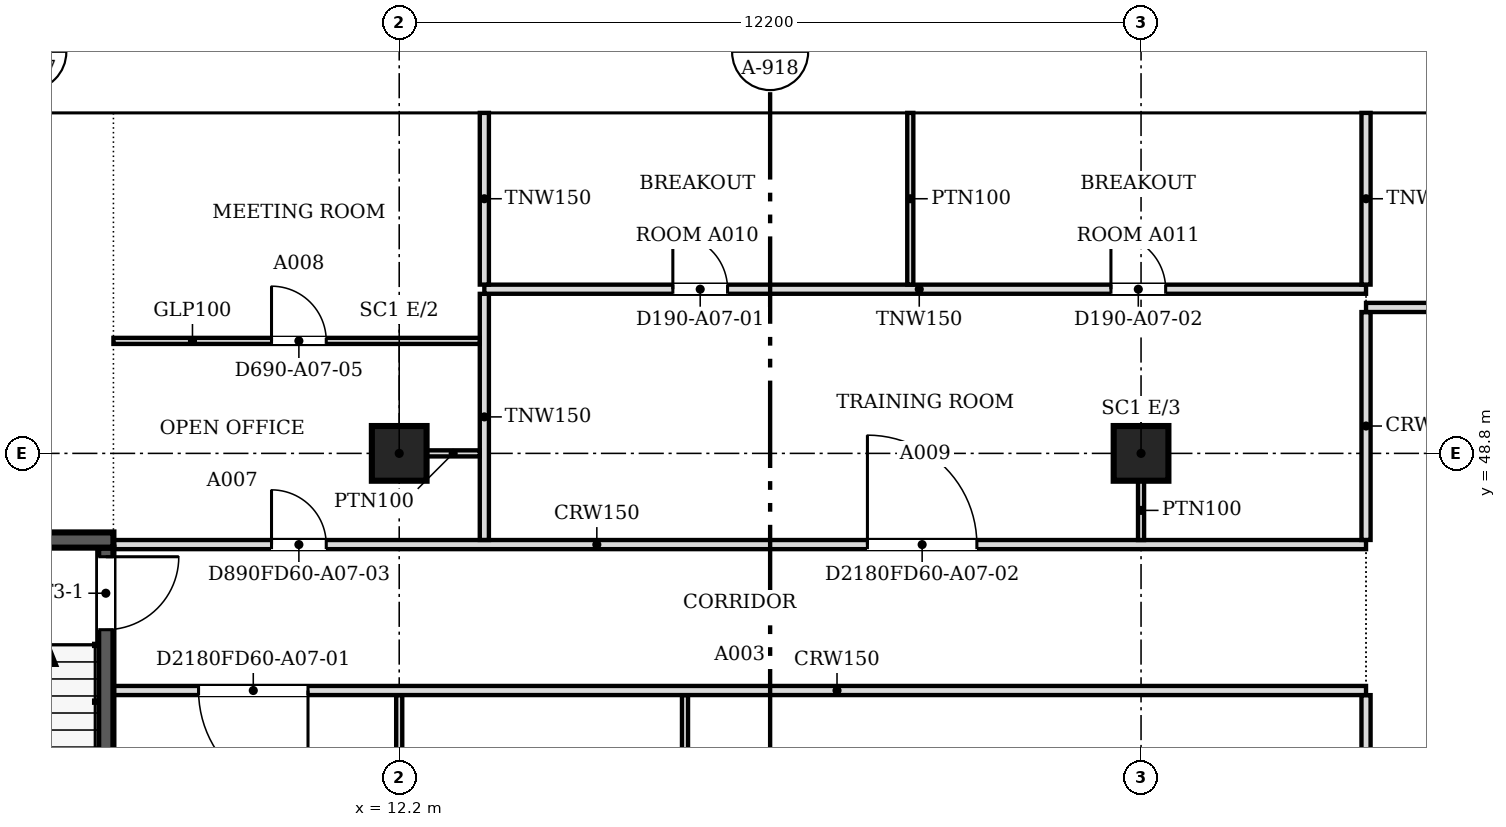
"""IFC4 building model, lengths in metres.
Left out: names, types, materials, properties, quantities, classifications, styles, units other than length and angle.
Written with IfcOpenShell. Run it as: python <this file> out.ifc"""

import sys

from ifc_helpers import new_model, si_unit, direction, frame, frame_2d, origin, origin_2d, place, context, subcontext, project, spatial, polyline, rectangle, outline, extrude, faceted_brep, source, transform, mapped, element, fill, save


model = new_model("IFC4")
c1 = context("Model", 3, precision=1e-05, world=origin(), true_north=direction((0.0, 1.0)))
c2 = subcontext(c1, "Body", "Model", "MODEL_VIEW")
j1 = project(units=[si_unit("LENGTHUNIT", "METRE"), si_unit("PLANEANGLEUNIT", "RADIAN")], contexts=[c1])
p1 = place(None, origin())
s1 = spatial("IfcSite", under=j1, at=p1, CompositionType="ELEMENT")
p2 = place(p1, origin())
s2 = spatial("IfcBuilding", under=s1, at=p2, CompositionType="ELEMENT")
p3 = place(p2, frame((0.0, 0.0, 80.0)))
s3 = spatial("IfcBuildingStorey", under=s2, at=p3, CompositionType="ELEMENT", Elevation=80.0)
for number, where, z_axis, x_axis in (
    (1, (12.2, 48.8, 0.0), (0.0, 0.0, 1.0), (1.0, 0.0, 0.0)),
    (2, (24.4, 48.8, 0.0), (0.0, 0.0, 1.0), (1.0, 0.0, 0.0)),
):
    element("IfcColumn", number, at=place(p3, frame(where, z_axis=z_axis, x_axis=x_axis)), inside=s3, PredefinedType="COLUMN", context=c2, shape_type="SweptSolid", body=[
        extrude(rectangle(XDim=0.9, YDim=0.9, at=origin_2d()), origin(), (0.0, 0.0, 1.0), 3.6),
    ])
m1 = source(origin(), c2, "Body", "SweptSolid", [
    extrude(outline(polyline([(3.05, 0.0), (6.1, 3.8), (3.05, 7.6), (0.0, 3.8), (3.05, 0.0)])), frame((0.0, 0.25, 0.0), z_axis=(0.0, -1.0, 0.0), x_axis=(1.0, 0.0, 0.0)), (0.0, 0.0, 1.0), 0.5),
])
p4 = place(p3, frame((30.5, 54.65, -3.8), z_axis=(0.0, 0.0, 1.0), x_axis=(-1.0, 0.0, 0.0)))
e3 = element("IfcWall", 3, at=p4, inside=s3, PredefinedType="SOLIDWALL", context=c2, shape_type="MappedRepresentation", body=[
    mapped(m1, transform((0.0, 0.0, 0.0), scale=1.0)),
])
m2 = source(origin(), c2, "Body", "SweptSolid", [
    extrude(outline(polyline([(3.05, 0.399), (5.78, 3.8), (3.05, 7.201), (0.321, 3.8), (3.05, 0.399)])), frame((0.0, 0.26, 0.0), z_axis=(0.0, -1.0, 0.0), x_axis=(1.0, 0.0, 0.0)), (0.0, 0.0, 1.0), 0.52),
])
p5 = place(p4, origin())
e4 = element("IfcOpeningElement", 4, at=p5, cuts=e3, PredefinedType="OPENING", context=c2, shape_type="MappedRepresentation", body=[
    mapped(m2, transform((0.0, 0.0, 0.0), scale=1.0)),
])
m3 = source(origin(), c2, "Body", "Brep", [
    faceted_brep([(3.05, -0.25, 0.0), (6.1, -0.25, 3.8), (6.1, -0.25, 3.8), (3.05, -0.25, 7.6), (0.0, -0.25, 3.8), (0.0, 0.25, 3.8), (3.05, 0.25, 7.6), (6.1, 0.25, 3.8), (6.1, 0.25, 3.8), (3.05, 0.25, 0.0)], [[[0, 1, 2, 3, 4]], [[5, 6, 7, 8, 9]], [[9, 8, 1, 0]], [[7, 6, 3, 2]], [[6, 5, 4, 3]], [[5, 9, 0, 4]], [[1, 8, 7, 2]]]),
])
p6 = place(p3, frame((24.4, 54.65, -3.8), z_axis=(0.0, 0.0, 1.0), x_axis=(-1.0, 0.0, 0.0)))
e5 = element("IfcWall", 5, at=p6, inside=s3, PredefinedType="SOLIDWALL", context=c2, shape_type="MappedRepresentation", body=[
    mapped(m3, transform((0.0, 0.0, 0.0), scale=1.0)),
])
p7 = place(p6, origin())
e6 = element("IfcOpeningElement", 6, at=p7, cuts=e5, PredefinedType="OPENING", context=c2, shape_type="MappedRepresentation", body=[
    mapped(m2, transform((0.0, 0.0, 0.0), scale=1.0)),
])
p8 = place(p3, frame((18.3, 54.65, -3.8), z_axis=(0.0, 0.0, 1.0), x_axis=(-1.0, 0.0, 0.0)))
e7 = element("IfcWall", 7, at=p8, inside=s3, PredefinedType="SOLIDWALL", context=c2, shape_type="MappedRepresentation", body=[
    mapped(m1, transform((0.0, 0.0, 0.0), scale=1.0)),
])
p9 = place(p8, origin())
e8 = element("IfcOpeningElement", 8, at=p9, cuts=e7, PredefinedType="OPENING", context=c2, shape_type="MappedRepresentation", body=[
    mapped(m2, transform((0.0, 0.0, 0.0), scale=1.0)),
])
m4 = source(origin(), c2, "Body", "Brep", [
    faceted_brep([(3.05, -0.25, 0.0), (6.053, -0.25, 3.8), (3.05, -0.25, 7.6), (0.0, -0.25, 3.8), (0.0, 0.25, 3.8), (3.05, 0.25, 7.6), (6.007, 0.25, 3.859), (6.007, 0.25, 3.741), (3.05, 0.25, 0.0), (6.053, 0.0, 3.8)], [[[0, 1, 2, 3]], [[4, 5, 6, 7, 8]], [[8, 7, 9, 1, 0]], [[6, 5, 2, 1, 9]], [[5, 4, 3, 2]], [[4, 8, 0, 3]], [[9, 7, 6]]]),
])
p10 = place(p3, frame((12.2, 54.65, -3.8), z_axis=(0.0, 0.0, 1.0), x_axis=(-1.0, 0.0, 0.0)))
e9 = element("IfcWall", 9, at=p10, inside=s3, PredefinedType="SOLIDWALL", context=c2, shape_type="MappedRepresentation", body=[
    mapped(m4, transform((0.0, 0.0, 0.0), scale=1.0)),
])
m5 = source(origin(), c2, "Body", "SweptSolid", [
    extrude(outline(polyline([(3.049, 0.401), (5.735, 3.8), (3.049, 7.199), (0.321, 3.8), (3.049, 0.401)])), frame((0.0, 0.26, 0.0), z_axis=(0.0, -1.0, 0.0), x_axis=(1.0, 0.0, 0.0)), (0.0, 0.0, 1.0), 0.52),
])
p11 = place(p10, origin())
e10 = element("IfcOpeningElement", 10, at=p11, cuts=e9, PredefinedType="OPENING", context=c2, shape_type="MappedRepresentation", body=[
    mapped(m5, transform((0.0, 0.0, 0.0), scale=1.0)),
])
p12 = place(p2, frame((0.0, 0.0, 83.8)))
s4 = spatial("IfcBuildingStorey", under=s2, at=p12, CompositionType="ELEMENT", Elevation=83.8)
p13 = place(p12, frame((33.55, 54.65, -3.8), z_axis=(0.0, 0.0, 1.0), x_axis=(-1.0, 0.0, 0.0)))
e11 = element("IfcWall", 11, at=p13, inside=s4, PredefinedType="SOLIDWALL", context=c2, shape_type="MappedRepresentation", body=[
    mapped(m1, transform((0.0, 0.0, 0.0), scale=1.0)),
])
p14 = place(p13, origin())
e12 = element("IfcOpeningElement", 12, at=p14, cuts=e11, PredefinedType="OPENING", context=c2, shape_type="MappedRepresentation", body=[
    mapped(m2, transform((0.0, 0.0, 0.0), scale=1.0)),
])
p15 = place(p12, frame((27.45, 54.65, -3.8), z_axis=(0.0, 0.0, 1.0), x_axis=(-1.0, 0.0, 0.0)))
e13 = element("IfcWall", 13, at=p15, inside=s4, PredefinedType="SOLIDWALL", context=c2, shape_type="MappedRepresentation", body=[
    mapped(m3, transform((0.0, 0.0, 0.0), scale=1.0)),
])
p16 = place(p15, origin())
e14 = element("IfcOpeningElement", 14, at=p16, cuts=e13, PredefinedType="OPENING", context=c2, shape_type="MappedRepresentation", body=[
    mapped(m2, transform((0.0, 0.0, 0.0), scale=1.0)),
])
p17 = place(p12, frame((21.35, 54.65, -3.8), z_axis=(0.0, 0.0, 1.0), x_axis=(-1.0, 0.0, 0.0)))
e15 = element("IfcWall", 15, at=p17, inside=s4, PredefinedType="SOLIDWALL", context=c2, shape_type="MappedRepresentation", body=[
    mapped(m1, transform((0.0, 0.0, 0.0), scale=1.0)),
])
p18 = place(p17, origin())
e16 = element("IfcOpeningElement", 16, at=p18, cuts=e15, PredefinedType="OPENING", context=c2, shape_type="MappedRepresentation", body=[
    mapped(m2, transform((0.0, 0.0, 0.0), scale=1.0)),
])
p19 = place(p12, frame((15.25, 54.65, -3.8), z_axis=(0.0, 0.0, 1.0), x_axis=(-1.0, 0.0, 0.0)))
e17 = element("IfcWall", 17, at=p19, inside=s4, PredefinedType="SOLIDWALL", context=c2, shape_type="MappedRepresentation", body=[
    mapped(m1, transform((0.0, 0.0, 0.0), scale=1.0)),
])
p20 = place(p19, origin())
e18 = element("IfcOpeningElement", 18, at=p20, cuts=e17, PredefinedType="OPENING", context=c2, shape_type="MappedRepresentation", body=[
    mapped(m2, transform((0.0, 0.0, 0.0), scale=1.0)),
])
m6 = source(origin(), c2, "Body", "Brep", [
    faceted_brep([(3.003, -0.25, 0.0), (3.05, -0.25, 0.06), (3.05, -0.25, 7.54), (3.003, -0.25, 7.6), (0.0, -0.25, 3.8), (0.0, 0.25, 3.8), (2.957, 0.25, 7.541), (2.957, 0.25, 0.059), (3.003, 0.0, 0.0), (3.003, 0.0, 7.6)], [[[0, 1, 2, 3, 4]], [[5, 6, 7]], [[1, 0, 8]], [[9, 3, 2]], [[6, 5, 4, 3, 9]], [[5, 7, 8, 0, 4]], [[1, 8, 7, 6, 9, 2]]]),
])
p21 = place(p12, frame((9.15, 54.65, -3.8), z_axis=(0.0, 0.0, 1.0), x_axis=(-1.0, 0.0, 0.0)))
e19 = element("IfcWall", 19, at=p21, inside=s4, PredefinedType="SOLIDWALL", context=c2, shape_type="MappedRepresentation", body=[
    mapped(m6, transform((0.0, 0.0, 0.0), scale=1.0)),
])
m7 = source(origin(), c2, "Body", "SweptSolid", [
    extrude(outline(polyline([(2.803, 6.944), (0.319, 3.8), (2.803, 0.656), (2.803, 6.944)])), frame((0.0, 0.26, 0.0), z_axis=(0.0, -1.0, 0.0), x_axis=(1.0, 0.0, 0.0)), (0.0, 0.0, 1.0), 0.52),
])
p22 = place(p21, origin())
e20 = element("IfcOpeningElement", 20, at=p22, cuts=e19, PredefinedType="OPENING", context=c2, shape_type="MappedRepresentation", body=[
    mapped(m7, transform((0.0, 0.0, 0.0), scale=1.0)),
])
p23 = place(p3, frame((3.6, 47.375, 0.0), z_axis=(0.0, 0.0, 1.0), x_axis=(1.0, 0.0, 0.0)))
e21 = element("IfcWall", 21, at=p23, inside=s3, PredefinedType="SOLIDWALL", context=c2, shape_type="SweptSolid", body=[
    extrude(rectangle(XDim=3.9, YDim=0.25, at=frame_2d((1.95, 0.0))), origin(), (0.0, 0.0, 1.0), 3.8),
])
p24 = place(p3, frame((7.375, 47.25, 0.0), z_axis=(0.0, 0.0, 1.0), x_axis=(0.0, -1.0, 0.0)))
e22 = element("IfcWall", 22, at=p24, inside=s3, PredefinedType="SOLIDWALL", context=c2, shape_type="SweptSolid", body=[
    extrude(rectangle(XDim=8.0, YDim=0.25, at=frame_2d((4.0, 0.0))), origin(), (0.0, 0.0, 1.0), 3.8),
])
m8 = source(origin(), c2, "Body", "SweptSolid", [
    extrude(rectangle(XDim=1.2, YDim=2.1, at=frame_2d((0.6, 1.05))), frame((0.0, 0.135, 0.0), z_axis=(0.0, -1.0, 0.0), x_axis=(1.0, 0.0, 0.0)), (0.0, 0.0, 1.0), 0.27),
])
p25 = place(p24, frame((0.15, 0.0, 0.0)))
e23 = element("IfcOpeningElement", 23, at=p25, cuts=e22, PredefinedType="OPENING", context=c2, shape_type="MappedRepresentation", body=[
    mapped(m8, transform((0.0, 0.0, 0.0), scale=1.0)),
])
p26 = place(p3, frame((28.1, 18.8, 0.0), z_axis=(0.0, 0.0, 1.0), x_axis=(0.0, 1.0, 0.0)))
e24 = element("IfcWall", 24, at=p26, inside=s3, PredefinedType="PARTITIONING", context=c2, shape_type="SweptSolid", body=[
    extrude(rectangle(XDim=26.024, YDim=0.15, at=frame_2d((13.012, 0.0))), origin(), (0.0, 0.0, 1.0), 3.067),
])
m9 = source(origin(), c2, "Body", "SweptSolid", [
    extrude(rectangle(XDim=0.9, YDim=2.1, at=frame_2d((0.45, 1.05))), frame((0.0, 0.085, 0.0), z_axis=(0.0, -1.0, 0.0), x_axis=(1.0, 0.0, 0.0)), (0.0, 0.0, 1.0), 0.17),
])
p27 = place(p26, frame((1.1, 0.0, 0.0)))
e25 = element("IfcOpeningElement", 25, at=p27, cuts=e24, PredefinedType="OPENING", context=c2, shape_type="MappedRepresentation", body=[
    mapped(m9, transform((0.0, 0.0, 0.0), scale=1.0)),
])
m10 = source(origin(), c2, "Body", "SweptSolid", [
    extrude(rectangle(XDim=1.0, YDim=2.1, at=frame_2d((0.5, 1.05))), frame((0.0, 0.085, 0.0), z_axis=(0.0, -1.0, 0.0), x_axis=(1.0, 0.0, 0.0)), (0.0, 0.0, 1.0), 0.17),
])
p28 = place(p26, frame((22.951, 0.0, 0.0)))
e26 = element("IfcOpeningElement", 26, at=p28, cuts=e24, PredefinedType="OPENING", context=c2, shape_type="MappedRepresentation", body=[
    mapped(m10, transform((0.0, 0.0, 0.0), scale=1.0)),
])
p29 = place(p26, frame((8.2, 0.0, 0.0)))
e27 = element("IfcOpeningElement", 27, at=p29, cuts=e24, PredefinedType="OPENING", context=c2, shape_type="MappedRepresentation", body=[
    mapped(m9, transform((0.0, 0.0, 0.0), scale=1.0)),
])
p30 = place(p26, frame((15.8, 0.0, 0.0)))
e28 = element("IfcOpeningElement", 28, at=p30, cuts=e24, PredefinedType="OPENING", context=c2, shape_type="MappedRepresentation", body=[
    mapped(m10, transform((0.0, 0.0, 0.0), scale=1.0)),
])
p31 = place(p3, frame((16.9, 39.726, 0.0), z_axis=(0.0, 0.0, 1.0), x_axis=(0.0, 1.0, 0.0)))
e29 = element("IfcWall", 29, at=p31, inside=s3, PredefinedType="PARTITIONING", context=c2, shape_type="SweptSolid", body=[
    extrude(rectangle(XDim=5.098, YDim=0.1, at=frame_2d((2.549, 0.0))), origin(), (0.0, 0.0, 1.0), 3.067),
])
m11 = source(origin(), c2, "Body", "SweptSolid", [
    extrude(rectangle(XDim=0.9, YDim=2.1, at=frame_2d((0.45, 1.05))), frame((0.0, 0.06, 0.0), z_axis=(0.0, -1.0, 0.0), x_axis=(1.0, 0.0, 0.0)), (0.0, 0.0, 1.0), 0.12),
])
p32 = place(p31, frame((2.1, 0.0, 0.0)))
e30 = element("IfcOpeningElement", 30, at=p32, cuts=e29, PredefinedType="OPENING", context=c2, shape_type="MappedRepresentation", body=[
    mapped(m11, transform((0.0, 0.0, 0.0), scale=1.0)),
])
p33 = place(p3, frame((12.2, 41.701, 0.0), z_axis=(0.0, 0.0, 1.0), x_axis=(0.0, 1.0, 0.0)))
e31 = element("IfcWall", 31, at=p33, inside=s3, PredefinedType="PARTITIONING", context=c2, shape_type="SweptSolid", body=[
    extrude(rectangle(XDim=3.123, YDim=0.1, at=frame_2d((1.562, 0.0))), origin(), (0.0, 0.0, 1.0), 3.067),
])
p34 = place(p3, frame((28.1, 44.9, 0.0), z_axis=(0.0, 0.0, 1.0), x_axis=(-1.0, 0.0, 0.0)))
e32 = element("IfcWall", 32, at=p34, inside=s3, PredefinedType="PARTITIONING", context=c2, shape_type="SweptSolid", body=[
    extrude(rectangle(XDim=20.6, YDim=0.15, at=frame_2d((10.3, 0.0))), origin(), (0.0, 0.0, 1.0), 3.067),
])
m12 = source(origin(), c2, "Body", "SweptSolid", [
    extrude(rectangle(XDim=1.8, YDim=2.1, at=frame_2d((0.9, 1.05))), frame((0.0, 0.085, 0.0), z_axis=(0.0, -1.0, 0.0), x_axis=(1.0, 0.0, 0.0)), (0.0, 0.0, 1.0), 0.17),
])
p35 = place(p34, frame((17.4, 0.0, 0.0)))
e33 = element("IfcOpeningElement", 33, at=p35, cuts=e32, PredefinedType="OPENING", context=c2, shape_type="MappedRepresentation", body=[
    mapped(m12, transform((0.0, 0.0, 0.0), scale=1.0)),
])
p36 = place(p3, frame((7.5, 47.3, 0.0), z_axis=(0.0, 0.0, 1.0), x_axis=(1.0, 0.0, 0.0)))
e34 = element("IfcWall", 34, at=p36, inside=s3, PredefinedType="PARTITIONING", context=c2, shape_type="SweptSolid", body=[
    extrude(rectangle(XDim=20.6, YDim=0.15, at=frame_2d((10.3, 0.0))), origin(), (0.0, 0.0, 1.0), 3.067),
])
p37 = place(p36, frame((2.6, 0.0, 0.0)))
e35 = element("IfcOpeningElement", 35, at=p37, cuts=e34, PredefinedType="OPENING", context=c2, shape_type="MappedRepresentation", body=[
    mapped(m9, transform((0.0, 0.0, 0.0), scale=1.0)),
])
p38 = place(p36, frame((12.4, 0.0, 0.0)))
e36 = element("IfcOpeningElement", 36, at=p38, cuts=e34, PredefinedType="OPENING", context=c2, shape_type="MappedRepresentation", body=[
    mapped(m12, transform((0.0, 0.0, 0.0), scale=1.0)),
])
p39 = place(p3, frame((13.6, 47.376, 0.0), z_axis=(0.0, 0.0, 1.0), x_axis=(0.0, 1.0, 0.0)))
e37 = element("IfcWall", 37, at=p39, inside=s3, PredefinedType="PARTITIONING", context=c2, shape_type="SweptSolid", body=[
    extrude(rectangle(XDim=4.048, YDim=0.15, at=frame_2d((2.024, 0.0))), origin(), (0.0, 0.0, 1.0), 3.067),
])
p40 = place(p3, frame((28.1, 47.376, 0.0), z_axis=(0.0, 0.0, 1.0), x_axis=(0.0, 1.0, 0.0)))
e38 = element("IfcWall", 38, at=p40, inside=s3, PredefinedType="PARTITIONING", context=c2, shape_type="SweptSolid", body=[
    extrude(rectangle(XDim=3.748, YDim=0.15, at=frame_2d((1.874, 0.0))), origin(), (0.0, 0.0, 1.0), 3.067),
])
p41 = place(p3, frame((24.4, 48.35, 0.0), z_axis=(0.0, 0.0, 1.0), x_axis=(0.0, -1.0, 0.0)))
e39 = element("IfcWall", 39, at=p41, inside=s3, PredefinedType="PARTITIONING", context=c2, shape_type="SweptSolid", body=[
    extrude(rectangle(XDim=0.975, YDim=0.1, at=frame_2d((0.488, 0.0))), origin(), (0.0, 0.0, 1.0), 3.067),
])
p42 = place(p3, frame((12.65, 48.8, 0.0), z_axis=(0.0, 0.0, 1.0), x_axis=(1.0, 0.0, 0.0)))
e40 = element("IfcWall", 40, at=p42, inside=s3, PredefinedType="PARTITIONING", context=c2, shape_type="SweptSolid", body=[
    extrude(rectangle(XDim=0.875, YDim=0.1, at=frame_2d((0.438, 0.0))), origin(), (0.0, 0.0, 1.0), 3.067),
])
p43 = place(p3, frame((7.5, 50.65, 0.0), z_axis=(0.0, 0.0, 1.0), x_axis=(1.0, 0.0, 0.0)))
e41 = element("IfcWall", 41, at=p43, inside=s3, PredefinedType="PARTITIONING", context=c2, shape_type="SweptSolid", body=[
    extrude(rectangle(XDim=6.024, YDim=0.1, at=frame_2d((3.012, 0.0))), origin(), (0.0, 0.0, 1.0), 3.067),
])
p44 = place(p43, frame((2.6, 0.0, 0.0)))
e42 = element("IfcOpeningElement", 42, at=p44, cuts=e41, PredefinedType="OPENING", context=c2, shape_type="MappedRepresentation", body=[
    mapped(m11, transform((0.0, 0.0, 0.0), scale=1.0)),
])
p45 = place(p3, frame((28.1, 51.2, 0.0), z_axis=(0.0, 0.0, 1.0), x_axis=(1.0, 0.0, 0.0)))
e43 = element("IfcWall", 43, at=p45, inside=s3, PredefinedType="PARTITIONING", context=c2, shape_type="SweptSolid", body=[
    extrude(rectangle(XDim=31.438, YDim=0.15, at=frame_2d((15.719, 0.0))), origin(), (0.0, 0.0, 1.0), 3.067),
])
p46 = place(p45, frame((27.501, 0.0, 0.0)))
e44 = element("IfcOpeningElement", 44, at=p46, cuts=e43, PredefinedType="OPENING", context=c2, shape_type="MappedRepresentation", body=[
    mapped(m9, transform((0.0, 0.0, 0.0), scale=1.0)),
])
p47 = place(p45, frame((5.6, 0.0, 0.0)))
e45 = element("IfcOpeningElement", 45, at=p47, cuts=e43, PredefinedType="OPENING", context=c2, shape_type="MappedRepresentation", body=[
    mapped(m9, transform((0.0, 0.0, 0.0), scale=1.0)),
])
p48 = place(p45, frame((17.8, 0.0, 0.0)))
e46 = element("IfcOpeningElement", 46, at=p48, cuts=e43, PredefinedType="OPENING", context=c2, shape_type="MappedRepresentation", body=[
    mapped(m9, transform((0.0, 0.0, 0.0), scale=1.0)),
])
p49 = place(p3, frame((13.6, 51.5, 0.0), z_axis=(0.0, 0.0, 1.0), x_axis=(1.0, 0.0, 0.0)))
e47 = element("IfcWall", 47, at=p49, inside=s3, PredefinedType="PARTITIONING", context=c2, shape_type="SweptSolid", body=[
    extrude(rectangle(XDim=14.5, YDim=0.15, at=frame_2d((7.25, 0.0))), origin(), (0.0, 0.0, 1.0), 3.067),
])
p50 = place(p49, frame((3.1, 0.0, 0.0)))
e48 = element("IfcOpeningElement", 48, at=p50, cuts=e47, PredefinedType="OPENING", context=c2, shape_type="MappedRepresentation", body=[
    mapped(m9, transform((0.0, 0.0, 0.0), scale=1.0)),
])
p51 = place(p49, frame((10.305, 0.0, 0.0)))
e49 = element("IfcOpeningElement", 49, at=p51, cuts=e47, PredefinedType="OPENING", context=c2, shape_type="MappedRepresentation", body=[
    mapped(m9, transform((0.0, 0.0, 0.0), scale=1.0)),
])
p52 = place(p3, frame((13.6, 51.576, 0.0), z_axis=(0.0, 0.0, 1.0), x_axis=(0.0, 1.0, 0.0)))
e50 = element("IfcWall", 50, at=p52, inside=s3, PredefinedType="PARTITIONING", context=c2, shape_type="SweptSolid", body=[
    extrude(rectangle(XDim=2.824, YDim=0.15, at=frame_2d((1.412, 0.0))), origin(), (0.0, 0.0, 1.0), 3.067),
])
p53 = place(p3, frame((20.605, 51.576, 0.0), z_axis=(0.0, 0.0, 1.0), x_axis=(0.0, 1.0, 0.0)))
e51 = element("IfcWall", 51, at=p53, inside=s3, PredefinedType="PARTITIONING", context=c2, shape_type="SweptSolid", body=[
    extrude(rectangle(XDim=2.824, YDim=0.1, at=frame_2d((1.412, 0.0))), origin(), (0.0, 0.0, 1.0), 3.067),
])
p54 = place(p3, frame((28.1, 51.576, 0.0), z_axis=(0.0, 0.0, 1.0), x_axis=(0.0, 1.0, 0.0)))
e52 = element("IfcWall", 52, at=p54, inside=s3, PredefinedType="PARTITIONING", context=c2, shape_type="SweptSolid", body=[
    extrude(rectangle(XDim=2.824, YDim=0.15, at=frame_2d((1.412, 0.0))), origin(), (0.0, 0.0, 1.0), 3.067),
])
m13 = source(origin(), c2, "Body", "SweptSolid", [
    extrude(rectangle(XDim=1.2, YDim=2.1, at=frame_2d((0.6, 1.05))), frame((0.0, 0.025, 0.0), z_axis=(0.0, -1.0, 0.0), x_axis=(1.0, 0.0, 0.0)), (0.0, 0.0, 1.0), 0.05),
])
p55 = place(p25, origin())
e53 = element("IfcDoor", 53, at=p55, inside=s3, OperationType="SINGLE_SWING_LEFT", PredefinedType="DOOR", context=c2, shape_type="MappedRepresentation", body=[
    mapped(m13, transform((0.0, 0.0, 0.0), scale=1.0)),
])
fill(e23, e53)
m14 = source(origin(), c2, "Body", "SweptSolid", [
    extrude(rectangle(XDim=1.8, YDim=2.1, at=frame_2d((0.9, 1.05))), frame((0.0, 0.025, 0.0), z_axis=(0.0, -1.0, 0.0), x_axis=(1.0, 0.0, 0.0)), (0.0, 0.0, 1.0), 0.05),
])
p56 = place(p35, origin())
e54 = element("IfcDoor", 54, at=p56, inside=s3, OperationType="DOUBLE_DOOR_SINGLE_SWING", PredefinedType="DOOR", context=c2, shape_type="MappedRepresentation", body=[
    mapped(m14, transform((0.0, 0.0, 0.0), scale=1.0)),
])
fill(e33, e54)
m15 = source(origin(), c2, "Body", "SweptSolid", [
    extrude(rectangle(XDim=0.9, YDim=2.1, at=frame_2d((0.45, 1.05))), frame((0.0, 0.025, 0.0), z_axis=(0.0, -1.0, 0.0), x_axis=(1.0, 0.0, 0.0)), (0.0, 0.0, 1.0), 0.05),
])
p57 = place(p44, origin())
e55 = element("IfcDoor", 55, at=p57, inside=s3, OperationType="SINGLE_SWING_LEFT", PredefinedType="DOOR", context=c2, shape_type="MappedRepresentation", body=[
    mapped(m15, transform((0.0, 0.0, 0.0), scale=1.0)),
])
fill(e42, e55)
p58 = place(p37, origin())
e56 = element("IfcDoor", 56, at=p58, inside=s3, OperationType="SINGLE_SWING_LEFT", PredefinedType="DOOR", context=c2, shape_type="MappedRepresentation", body=[
    mapped(m15, transform((0.0, 0.0, 0.0), scale=1.0)),
])
fill(e35, e56)
p59 = place(p50, origin())
e57 = element("IfcDoor", 57, at=p59, inside=s3, OperationType="SINGLE_SWING_LEFT", PredefinedType="DOOR", context=c2, shape_type="MappedRepresentation", body=[
    mapped(m15, transform((0.0, 0.0, 0.0), scale=1.0)),
])
fill(e48, e57)
p60 = place(p51, origin())
e58 = element("IfcDoor", 58, at=p60, inside=s3, OperationType="SINGLE_SWING_LEFT", PredefinedType="DOOR", context=c2, shape_type="MappedRepresentation", body=[
    mapped(m15, transform((0.0, 0.0, 0.0), scale=1.0)),
])
fill(e49, e58)
p61 = place(p38, origin())
e59 = element("IfcDoor", 59, at=p61, inside=s3, OperationType="DOUBLE_DOOR_SINGLE_SWING", PredefinedType="DOOR", context=c2, shape_type="MappedRepresentation", body=[
    mapped(m14, transform((0.0, 0.0, 0.0), scale=1.0)),
])
fill(e36, e59)
save(model, sys.argv[1])
